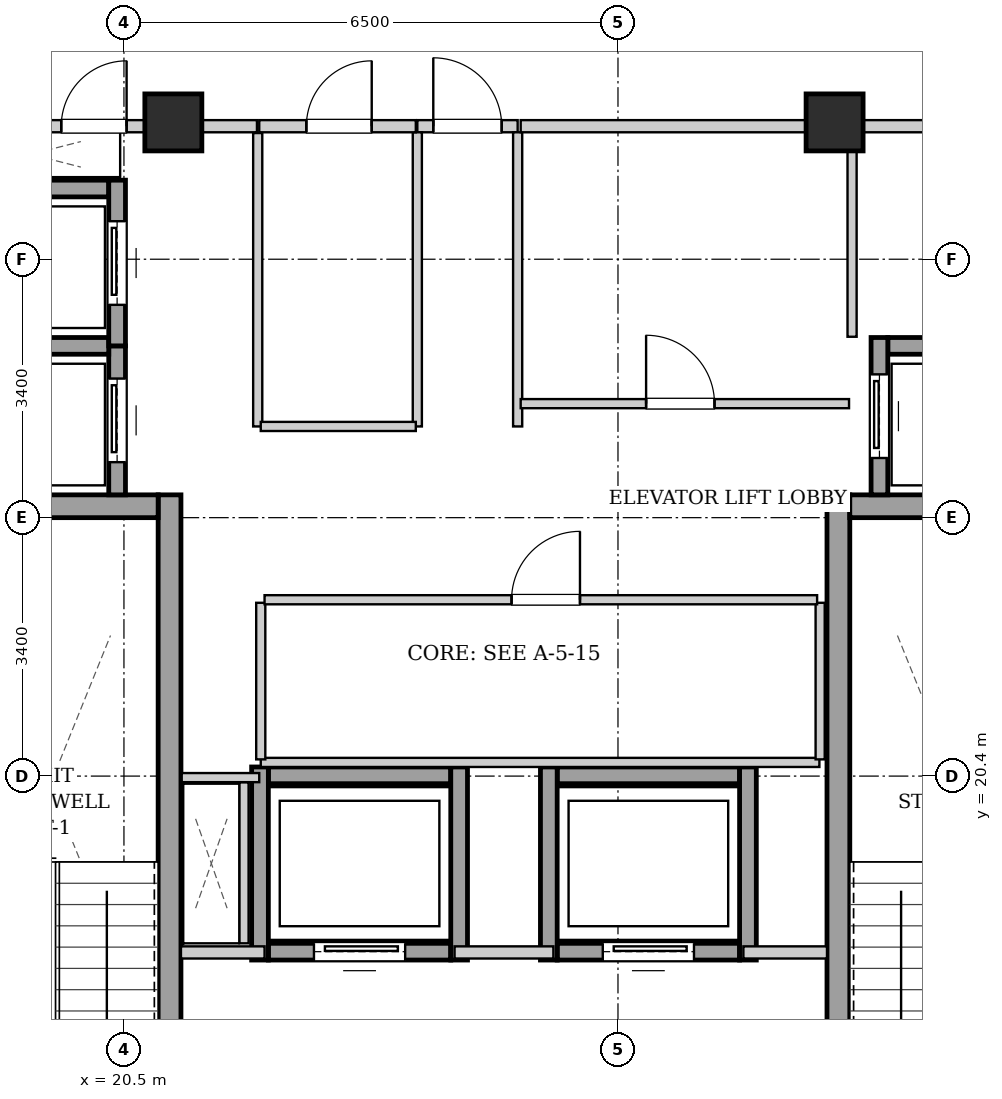
"""IFC4 building model, lengths in metres.
Left out: names, types, materials, properties, quantities, classifications, styles, units other than length and angle.
Written with IfcOpenShell. Run it as: python <this file> out.ifc"""

import sys

from ifc_helpers import new_model, si_unit, direction, frame, frame_2d, origin, origin_2d, place, context, subcontext, project, spatial, rectangle, extrude, element, fill, save


model = new_model("IFC4")
c1 = context("Model", 3, precision=1e-05, world=origin(), true_north=direction((0.0, 1.0)))
c2 = subcontext(c1, "Body", "Model", "MODEL_VIEW")
j1 = project(units=[si_unit("LENGTHUNIT", "METRE"), si_unit("PLANEANGLEUNIT", "RADIAN")], contexts=[c1])
p1 = place(None, origin())
s1 = spatial("IfcSite", under=j1, at=p1, CompositionType="ELEMENT")
p2 = place(p1, origin())
s2 = spatial("IfcBuilding", under=s1, at=p2, CompositionType="ELEMENT")
p3 = place(p2, frame((0.0, 0.0, 227.5)))
s3 = spatial("IfcBuildingStorey", under=s2, at=p3, CompositionType="ELEMENT", Elevation=227.5)
for number, where, z_axis, x_axis in (
    (1, (21.15, 29.0, 0.0), (0.0, 0.0, 1.0), (1.0, 0.0, 0.0)),
    (2, (29.85, 29.0, 0.0), (0.0, 0.0, 1.0), (1.0, 0.0, 0.0)),
):
    element("IfcColumn", number, at=place(p3, frame(where, z_axis=z_axis, x_axis=x_axis)), inside=s3, PredefinedType="COLUMN", context=c2, shape_type="SweptSolid", body=[
        extrude(rectangle(XDim=0.75, YDim=0.75, at=origin_2d()), origin(), (0.0, 0.0, 1.0), 3.4),
    ])
p4 = place(p3, frame((21.1, 15.1, 0.0), z_axis=(0.0, 0.0, 1.0), x_axis=(0.0, 1.0, 0.0)))
e3 = element("IfcWall", 3, at=p4, inside=s3, PredefinedType="SHEAR", context=c2, shape_type="SweptSolid", body=[
    extrude(rectangle(XDim=9.0, YDim=0.3, at=frame_2d((4.5, 0.0))), origin(), (0.0, 0.0, 1.0), 3.14),
])
p5 = place(p3, frame((18.1, 23.95, 0.0), z_axis=(0.0, 0.0, 1.0), x_axis=(1.0, 0.0, 0.0)))
e4 = element("IfcWall", 4, at=p5, inside=s3, PredefinedType="SHEAR", context=c2, shape_type="SweptSolid", body=[
    extrude(rectangle(XDim=2.85, YDim=0.3, at=frame_2d((1.425, 0.0))), origin(), (0.0, 0.0, 1.0), 3.14),
])
p6 = place(p3, frame((29.9, 15.1, 0.0), z_axis=(0.0, 0.0, 1.0), x_axis=(0.0, 1.0, 0.0)))
e5 = element("IfcWall", 5, at=p6, inside=s3, PredefinedType="SHEAR", context=c2, shape_type="SweptSolid", body=[
    extrude(rectangle(XDim=9.0, YDim=0.3, at=frame_2d((4.5, 0.0))), origin(), (0.0, 0.0, 1.0), 3.14),
])
p7 = place(p3, frame((30.05, 23.95, 0.0), z_axis=(0.0, 0.0, 1.0), x_axis=(1.0, 0.0, 0.0)))
e6 = element("IfcWall", 6, at=p7, inside=s3, PredefinedType="SHEAR", context=c2, shape_type="SweptSolid", body=[
    extrude(rectangle(XDim=2.85, YDim=0.3, at=frame_2d((1.425, 0.0))), origin(), (0.0, 0.0, 1.0), 3.14),
])
p8 = place(p3, frame((20.41, 24.1, 0.0), z_axis=(0.0, 0.0, 1.0), x_axis=(0.0, 1.0, 0.0)))
e7 = element("IfcWall", 7, at=p8, inside=s3, PredefinedType="SHEAR", context=c2, shape_type="SweptSolid", body=[
    extrude(rectangle(XDim=1.96, YDim=0.22, at=frame_2d((0.98, 0.0))), origin(), (0.0, 0.0, 1.0), 3.14),
])
p9 = place(p8, frame((0.43, 0.0, 0.0)))
e8 = element("IfcOpeningElement", 8, at=p9, cuts=e7, PredefinedType="OPENING", context=c2, shape_type="SweptSolid", body=[
    extrude(rectangle(XDim=1.1, YDim=2.15, at=frame_2d((0.55, 1.075))), frame((0.0, 0.12, 0.0), z_axis=(0.0, -1.0, 0.0), x_axis=(1.0, 0.0, 0.0)), (0.0, 0.0, 1.0), 0.24),
])
for number, where, z_axis, x_axis in (
    (9, (18.4, 26.06, 0.0), (0.0, 0.0, 1.0), (1.0, 0.0, 0.0)),
    (10, (18.4, 28.13, 0.0), (0.0, 0.0, 1.0), (1.0, 0.0, 0.0)),
):
    element("IfcWall", number, at=place(p3, frame(where, z_axis=z_axis, x_axis=x_axis)), inside=s3, PredefinedType="SHEAR", context=c2, shape_type="SweptSolid", body=[
        extrude(rectangle(XDim=1.9, YDim=0.22, at=frame_2d((0.95, 0.0))), origin(), (0.0, 0.0, 1.0), 3.14),
    ])
p10 = place(p3, frame((20.41, 26.06, 0.0), z_axis=(0.0, 0.0, 1.0), x_axis=(0.0, 1.0, 0.0)))
e11 = element("IfcWall", 11, at=p10, inside=s3, PredefinedType="SHEAR", context=c2, shape_type="SweptSolid", body=[
    extrude(rectangle(XDim=2.18, YDim=0.22, at=frame_2d((1.09, 0.0))), origin(), (0.0, 0.0, 1.0), 3.14),
])
p11 = place(p10, frame((0.54, 0.0, 0.0)))
e12 = element("IfcOpeningElement", 12, at=p11, cuts=e11, PredefinedType="OPENING", context=c2, shape_type="SweptSolid", body=[
    extrude(rectangle(XDim=1.1, YDim=2.15, at=frame_2d((0.55, 1.075))), frame((0.0, 0.12, 0.0), z_axis=(0.0, -1.0, 0.0), x_axis=(1.0, 0.0, 0.0)), (0.0, 0.0, 1.0), 0.24),
])
p12 = place(p3, frame((30.55, 26.06, 0.0), z_axis=(0.0, 0.0, 1.0), x_axis=(1.0, 0.0, 0.0)))
e13 = element("IfcWall", 13, at=p12, inside=s3, PredefinedType="SHEAR", context=c2, shape_type="SweptSolid", body=[
    extrude(rectangle(XDim=1.9, YDim=0.22, at=frame_2d((0.95, 0.0))), origin(), (0.0, 0.0, 1.0), 3.14),
])
p13 = place(p3, frame((30.44, 24.1, 0.0), z_axis=(0.0, 0.0, 1.0), x_axis=(0.0, 1.0, 0.0)))
e14 = element("IfcWall", 14, at=p13, inside=s3, PredefinedType="SHEAR", context=c2, shape_type="SweptSolid", body=[
    extrude(rectangle(XDim=2.07, YDim=0.22, at=frame_2d((1.035, 0.0))), origin(), (0.0, 0.0, 1.0), 3.14),
])
p14 = place(p13, frame((0.485, 0.0, 0.0)))
e15 = element("IfcOpeningElement", 15, at=p14, cuts=e14, PredefinedType="OPENING", context=c2, shape_type="SweptSolid", body=[
    extrude(rectangle(XDim=1.1, YDim=2.15, at=frame_2d((0.55, 1.075))), frame((0.0, 0.12, 0.0), z_axis=(0.0, -1.0, 0.0), x_axis=(1.0, 0.0, 0.0)), (0.0, 0.0, 1.0), 0.24),
])
p15 = place(p3, frame((22.4, 18.09, 0.0), z_axis=(0.0, 0.0, 1.0), x_axis=(1.0, 0.0, 0.0)))
e16 = element("IfcWall", 16, at=p15, inside=s3, PredefinedType="SHEAR", context=c2, shape_type="SweptSolid", body=[
    extrude(rectangle(XDim=2.4, YDim=0.22, at=frame_2d((1.2, 0.0))), origin(), (0.0, 0.0, 1.0), 3.14),
])
p16 = place(p15, frame((0.6, 0.0, 0.0)))
e17 = element("IfcOpeningElement", 17, at=p16, cuts=e16, PredefinedType="OPENING", context=c2, shape_type="SweptSolid", body=[
    extrude(rectangle(XDim=1.2, YDim=2.15, at=frame_2d((0.6, 1.075))), frame((0.0, 0.12, 0.0), z_axis=(0.0, -1.0, 0.0), x_axis=(1.0, 0.0, 0.0)), (0.0, 0.0, 1.0), 0.24),
])
p17 = place(p3, frame((22.4, 20.41, 0.0), z_axis=(0.0, 0.0, 1.0), x_axis=(1.0, 0.0, 0.0)))
e18 = element("IfcWall", 18, at=p17, inside=s3, PredefinedType="SHEAR", context=c2, shape_type="SweptSolid", body=[
    extrude(rectangle(XDim=2.4, YDim=0.22, at=frame_2d((1.2, 0.0))), origin(), (0.0, 0.0, 1.0), 3.14),
])
for number, where, z_axis, x_axis in (
    (19, (22.29, 17.98, 0.0), (0.0, 0.0, 1.0), (0.0, 1.0, 0.0)),
    (20, (24.91, 17.98, 0.0), (0.0, 0.0, 1.0), (0.0, 1.0, 0.0)),
):
    element("IfcWall", number, at=place(p3, frame(where, z_axis=z_axis, x_axis=x_axis)), inside=s3, PredefinedType="SHEAR", context=c2, shape_type="SweptSolid", body=[
        extrude(rectangle(XDim=2.54, YDim=0.22, at=frame_2d((1.27, 0.0))), origin(), (0.0, 0.0, 1.0), 3.14),
    ])
p18 = place(p3, frame((26.2, 18.09, 0.0), z_axis=(0.0, 0.0, 1.0), x_axis=(1.0, 0.0, 0.0)))
e21 = element("IfcWall", 21, at=p18, inside=s3, PredefinedType="SHEAR", context=c2, shape_type="SweptSolid", body=[
    extrude(rectangle(XDim=2.4, YDim=0.22, at=frame_2d((1.2, 0.0))), origin(), (0.0, 0.0, 1.0), 3.14),
])
p19 = place(p18, frame((0.6, 0.0, 0.0)))
e22 = element("IfcOpeningElement", 22, at=p19, cuts=e21, PredefinedType="OPENING", context=c2, shape_type="SweptSolid", body=[
    extrude(rectangle(XDim=1.2, YDim=2.15, at=frame_2d((0.6, 1.075))), frame((0.0, 0.12, 0.0), z_axis=(0.0, -1.0, 0.0), x_axis=(1.0, 0.0, 0.0)), (0.0, 0.0, 1.0), 0.24),
])
p20 = place(p3, frame((26.2, 20.41, 0.0), z_axis=(0.0, 0.0, 1.0), x_axis=(1.0, 0.0, 0.0)))
e23 = element("IfcWall", 23, at=p20, inside=s3, PredefinedType="SHEAR", context=c2, shape_type="SweptSolid", body=[
    extrude(rectangle(XDim=2.4, YDim=0.22, at=frame_2d((1.2, 0.0))), origin(), (0.0, 0.0, 1.0), 3.14),
])
for number, where, z_axis, x_axis in (
    (24, (26.09, 17.98, 0.0), (0.0, 0.0, 1.0), (0.0, 1.0, 0.0)),
    (25, (28.71, 17.98, 0.0), (0.0, 0.0, 1.0), (0.0, 1.0, 0.0)),
):
    element("IfcWall", number, at=place(p3, frame(where, z_axis=z_axis, x_axis=x_axis)), inside=s3, PredefinedType="SHEAR", context=c2, shape_type="SweptSolid", body=[
        extrude(rectangle(XDim=2.54, YDim=0.22, at=frame_2d((1.27, 0.0))), origin(), (0.0, 0.0, 1.0), 3.14),
    ])
p21 = place(p3, frame((21.25, 18.08, 0.0), z_axis=(0.0, 0.0, 1.0), x_axis=(1.0, 0.0, 0.0)))
e26 = element("IfcWall", 26, at=p21, inside=s3, PredefinedType="PARTITIONING", context=c2, shape_type="SweptSolid", body=[
    extrude(rectangle(XDim=1.1, YDim=0.16, at=frame_2d((0.55, 0.0))), origin(), (0.0, 0.0, 1.0), 3.14),
])
p22 = place(p3, frame((24.85, 18.08, 0.0), z_axis=(0.0, 0.0, 1.0), x_axis=(1.0, 0.0, 0.0)))
e27 = element("IfcWall", 27, at=p22, inside=s3, PredefinedType="PARTITIONING", context=c2, shape_type="SweptSolid", body=[
    extrude(rectangle(XDim=1.3, YDim=0.16, at=frame_2d((0.65, 0.0))), origin(), (0.0, 0.0, 1.0), 3.14),
])
p23 = place(p3, frame((28.65, 18.08, 0.0), z_axis=(0.0, 0.0, 1.0), x_axis=(1.0, 0.0, 0.0)))
e28 = element("IfcWall", 28, at=p23, inside=s3, PredefinedType="PARTITIONING", context=c2, shape_type="SweptSolid", body=[
    extrude(rectangle(XDim=1.1, YDim=0.16, at=frame_2d((0.55, 0.0))), origin(), (0.0, 0.0, 1.0), 3.14),
])
p24 = place(p3, frame((24.36, 28.95, 0.0), z_axis=(0.0, 0.0, 1.0), x_axis=(1.0, 0.0, 0.0)))
e29 = element("IfcWall", 29, at=p24, inside=s3, PredefinedType="PARTITIONING", context=c2, shape_type="SweptSolid", body=[
    extrude(rectangle(XDim=1.32, YDim=0.16, at=frame_2d((0.66, 0.0))), origin(), (0.0, 0.0, 1.0), 2.668),
])
p25 = place(p24, frame((0.21, 0.0, 0.0)))
e30 = element("IfcOpeningElement", 30, at=p25, cuts=e29, PredefinedType="OPENING", context=c2, shape_type="SweptSolid", body=[
    extrude(rectangle(XDim=0.9, YDim=2.05, at=frame_2d((0.45, 1.025))), frame((0.0, 0.09, 0.0), z_axis=(0.0, -1.0, 0.0), x_axis=(1.0, 0.0, 0.0)), (0.0, 0.0, 1.0), 0.18),
])
p26 = place(p3, frame((17.96, 28.95, 0.0), z_axis=(0.0, 0.0, 1.0), x_axis=(1.0, 0.0, 0.0)))
e31 = element("IfcWall", 31, at=p26, inside=s3, PredefinedType="PARTITIONING", context=c2, shape_type="SweptSolid", body=[
    extrude(rectangle(XDim=4.29, YDim=0.16, at=frame_2d((2.145, 0.0))), origin(), (0.0, 0.0, 1.0), 2.668),
])
p27 = place(p26, frame((1.715, 0.0, 0.0)))
e32 = element("IfcOpeningElement", 32, at=p27, cuts=e31, PredefinedType="OPENING", context=c2, shape_type="SweptSolid", body=[
    extrude(rectangle(XDim=0.86, YDim=2.05, at=frame_2d((0.43, 1.025))), frame((0.0, 0.09, 0.0), z_axis=(0.0, -1.0, 0.0), x_axis=(1.0, 0.0, 0.0)), (0.0, 0.0, 1.0), 0.18),
])
p28 = place(p3, frame((22.08, 18.2, 0.0), z_axis=(0.0, 0.0, 1.0), x_axis=(0.0, 1.0, 0.0)))
e33 = element("IfcWall", 33, at=p28, inside=s3, PredefinedType="PARTITIONING", context=c2, shape_type="SweptSolid", body=[
    extrude(rectangle(XDim=2.12, YDim=0.12, at=frame_2d((1.06, 0.0))), origin(), (0.0, 0.0, 1.0), 3.14),
])
p29 = place(p3, frame((22.28, 20.38, 0.0), z_axis=(0.0, 0.0, 1.0), x_axis=(-1.0, 0.0, 0.0)))
e34 = element("IfcWall", 34, at=p29, inside=s3, PredefinedType="PARTITIONING", context=c2, shape_type="SweptSolid", body=[
    extrude(rectangle(XDim=1.02, YDim=0.12, at=frame_2d((0.51, 0.0))), origin(), (0.0, 0.0, 1.0), 3.14),
])
for number, where, z_axis, x_axis in (
    (35, (24.36, 25.0, 0.0), (0.0, 0.0, 1.0), (0.0, 1.0, 0.0)),
    (36, (25.68, 25.0, 0.0), (0.0, 0.0, 1.0), (0.0, 1.0, 0.0)),
):
    element("IfcWall", number, at=place(p3, frame(where, z_axis=z_axis, x_axis=x_axis)), inside=s3, PredefinedType="PARTITIONING", context=c2, shape_type="SweptSolid", body=[
        extrude(rectangle(XDim=3.87, YDim=0.12, at=frame_2d((1.935, 0.0))), origin(), (0.0, 0.0, 1.0), 3.14),
    ])
p30 = place(p3, frame((30.08, 26.18, 0.0), z_axis=(0.0, 0.0, 1.0), x_axis=(0.0, 1.0, 0.0)))
e37 = element("IfcWall", 37, at=p30, inside=s3, PredefinedType="PARTITIONING", context=c2, shape_type="SweptSolid", body=[
    extrude(rectangle(XDim=2.68, YDim=0.12, at=frame_2d((1.34, 0.0))), origin(), (0.0, 0.0, 1.0), 3.14),
])
p31 = place(p3, frame((30.08, 28.95, 0.0), z_axis=(0.0, 0.0, 1.0), x_axis=(1.0, 0.0, 0.0)))
e38 = element("IfcWall", 38, at=p31, inside=s3, PredefinedType="PARTITIONING", context=c2, shape_type="SweptSolid", body=[
    extrude(rectangle(XDim=2.96, YDim=0.16, at=frame_2d((1.48, 0.0))), origin(), (0.0, 0.0, 1.0), 3.14),
])
p32 = place(p31, frame((1.045, 0.0, 0.0)))
e39 = element("IfcOpeningElement", 39, at=p32, cuts=e38, PredefinedType="OPENING", context=c2, shape_type="SweptSolid", body=[
    extrude(rectangle(XDim=0.86, YDim=2.05, at=frame_2d((0.43, 1.025))), frame((0.0, 0.09, 0.0), z_axis=(0.0, -1.0, 0.0), x_axis=(1.0, 0.0, 0.0)), (0.0, 0.0, 1.0), 0.18),
])
p33 = place(p3, frame((22.26, 25.0, 0.0), z_axis=(0.0, 0.0, 1.0), x_axis=(0.0, 1.0, 0.0)))
e40 = element("IfcWall", 40, at=p33, inside=s3, PredefinedType="PARTITIONING", context=c2, shape_type="SweptSolid", body=[
    extrude(rectangle(XDim=3.86, YDim=0.12, at=frame_2d((1.93, 0.0))), origin(), (0.0, 0.0, 1.0), 3.14),
])
p34 = place(p3, frame((22.3, 25.0, 0.0), z_axis=(0.0, 0.0, 1.0), x_axis=(1.0, 0.0, 0.0)))
e41 = element("IfcWall", 41, at=p34, inside=s3, PredefinedType="PARTITIONING", context=c2, shape_type="SweptSolid", body=[
    extrude(rectangle(XDim=2.04, YDim=0.12, at=frame_2d((1.02, 0.0))), origin(), (0.0, 0.0, 1.0), 3.14),
])
p35 = place(p3, frame((22.28, 28.95, 0.0), z_axis=(0.0, 0.0, 1.0), x_axis=(1.0, 0.0, 0.0)))
e42 = element("IfcWall", 42, at=p35, inside=s3, PredefinedType="PARTITIONING", context=c2, shape_type="SweptSolid", body=[
    extrude(rectangle(XDim=2.06, YDim=0.16, at=frame_2d((1.03, 0.0))), origin(), (0.0, 0.0, 1.0), 2.668),
])
p36 = place(p35, frame((0.62, 0.0, 0.0)))
e43 = element("IfcOpeningElement", 43, at=p36, cuts=e42, PredefinedType="OPENING", context=c2, shape_type="SweptSolid", body=[
    extrude(rectangle(XDim=0.86, YDim=2.05, at=frame_2d((0.43, 1.025))), frame((0.0, 0.09, 0.0), z_axis=(0.0, -1.0, 0.0), x_axis=(1.0, 0.0, 0.0)), (0.0, 0.0, 1.0), 0.18),
])
p37 = place(p3, frame((25.72, 28.95, 0.0), z_axis=(0.0, 0.0, 1.0), x_axis=(1.0, 0.0, 0.0)))
e44 = element("IfcWall", 44, at=p37, inside=s3, PredefinedType="PARTITIONING", context=c2, shape_type="SweptSolid", body=[
    extrude(rectangle(XDim=4.32, YDim=0.16, at=frame_2d((2.16, 0.0))), origin(), (0.0, 0.0, 1.0), 2.668),
])
p38 = place(p3, frame((25.72, 25.3, 0.0), z_axis=(0.0, 0.0, 1.0), x_axis=(1.0, 0.0, 0.0)))
e45 = element("IfcWall", 45, at=p38, inside=s3, PredefinedType="PARTITIONING", context=c2, shape_type="SweptSolid", body=[
    extrude(rectangle(XDim=4.32, YDim=0.12, at=frame_2d((2.16, 0.0))), origin(), (0.0, 0.0, 1.0), 3.14),
])
p39 = place(p38, frame((1.65, 0.0, 0.0)))
e46 = element("IfcOpeningElement", 46, at=p39, cuts=e45, PredefinedType="OPENING", context=c2, shape_type="SweptSolid", body=[
    extrude(rectangle(XDim=0.9, YDim=2.05, at=frame_2d((0.45, 1.025))), frame((0.0, 0.07, 0.0), z_axis=(0.0, -1.0, 0.0), x_axis=(1.0, 0.0, 0.0)), (0.0, 0.0, 1.0), 0.14),
])
p40 = place(p3, frame((22.3, 20.58, 0.0), z_axis=(0.0, 0.0, 1.0), x_axis=(1.0, 0.0, 0.0)))
e47 = element("IfcWall", 47, at=p40, inside=s3, PredefinedType="PARTITIONING", context=c2, shape_type="SweptSolid", body=[
    extrude(rectangle(XDim=7.35, YDim=0.12, at=frame_2d((3.675, 0.0))), origin(), (0.0, 0.0, 1.0), 3.14),
])
for number, where, z_axis, x_axis in (
    (48, (22.3, 20.62, 0.0), (0.0, 0.0, 1.0), (0.0, 1.0, 0.0)),
    (49, (29.66, 20.62, 0.0), (0.0, 0.0, 1.0), (0.0, 1.0, 0.0)),
):
    element("IfcWall", number, at=place(p3, frame(where, z_axis=z_axis, x_axis=x_axis)), inside=s3, PredefinedType="PARTITIONING", context=c2, shape_type="SweptSolid", body=[
        extrude(rectangle(XDim=2.06, YDim=0.12, at=frame_2d((1.03, 0.0))), origin(), (0.0, 0.0, 1.0), 3.14),
    ])
p41 = place(p3, frame((22.35, 22.72, 0.0), z_axis=(0.0, 0.0, 1.0), x_axis=(1.0, 0.0, 0.0)))
e50 = element("IfcWall", 50, at=p41, inside=s3, PredefinedType="PARTITIONING", context=c2, shape_type="SweptSolid", body=[
    extrude(rectangle(XDim=7.27, YDim=0.12, at=frame_2d((3.635, 0.0))), origin(), (0.0, 0.0, 1.0), 3.14),
])
p42 = place(p41, frame((3.25, 0.0, 0.0)))
e51 = element("IfcOpeningElement", 51, at=p42, cuts=e50, PredefinedType="OPENING", context=c2, shape_type="SweptSolid", body=[
    extrude(rectangle(XDim=0.9, YDim=2.05, at=frame_2d((0.45, 1.025))), frame((0.0, 0.07, 0.0), z_axis=(0.0, -1.0, 0.0), x_axis=(1.0, 0.0, 0.0)), (0.0, 0.0, 1.0), 0.14),
])
p43 = place(p9, origin())
e52 = element("IfcDoor", 52, at=p43, inside=s3, OperationType="SLIDING_TO_LEFT", PredefinedType="DOOR", context=c2, shape_type="SweptSolid", body=[
    extrude(rectangle(XDim=1.1, YDim=2.15, at=frame_2d((0.55, 1.075))), frame((0.0, 0.025, 0.0), z_axis=(0.0, -1.0, 0.0), x_axis=(1.0, 0.0, 0.0)), (0.0, 0.0, 1.0), 0.05),
])
fill(e8, e52)
p44 = place(p11, origin())
e53 = element("IfcDoor", 53, at=p44, inside=s3, OperationType="SLIDING_TO_LEFT", PredefinedType="DOOR", context=c2, shape_type="SweptSolid", body=[
    extrude(rectangle(XDim=1.1, YDim=2.15, at=frame_2d((0.55, 1.075))), frame((0.0, 0.025, 0.0), z_axis=(0.0, -1.0, 0.0), x_axis=(1.0, 0.0, 0.0)), (0.0, 0.0, 1.0), 0.05),
])
fill(e12, e53)
p45 = place(p14, origin())
e54 = element("IfcDoor", 54, at=p45, inside=s3, OperationType="SLIDING_TO_LEFT", PredefinedType="DOOR", context=c2, shape_type="SweptSolid", body=[
    extrude(rectangle(XDim=1.1, YDim=2.15, at=frame_2d((0.55, 1.075))), frame((0.0, 0.025, 0.0), z_axis=(0.0, -1.0, 0.0), x_axis=(1.0, 0.0, 0.0)), (0.0, 0.0, 1.0), 0.05),
])
fill(e15, e54)
p46 = place(p16, origin())
e55 = element("IfcDoor", 55, at=p46, inside=s3, OperationType="SLIDING_TO_LEFT", PredefinedType="DOOR", context=c2, shape_type="SweptSolid", body=[
    extrude(rectangle(XDim=1.2, YDim=2.15, at=frame_2d((0.6, 1.075))), frame((0.0, 0.025, 0.0), z_axis=(0.0, -1.0, 0.0), x_axis=(1.0, 0.0, 0.0)), (0.0, 0.0, 1.0), 0.05),
])
fill(e17, e55)
p47 = place(p19, origin())
e56 = element("IfcDoor", 56, at=p47, inside=s3, OperationType="SLIDING_TO_LEFT", PredefinedType="DOOR", context=c2, shape_type="SweptSolid", body=[
    extrude(rectangle(XDim=1.2, YDim=2.15, at=frame_2d((0.6, 1.075))), frame((0.0, 0.025, 0.0), z_axis=(0.0, -1.0, 0.0), x_axis=(1.0, 0.0, 0.0)), (0.0, 0.0, 1.0), 0.05),
])
fill(e22, e56)
p48 = place(p25, origin())
e57 = element("IfcDoor", 57, at=p48, inside=s3, OperationType="SINGLE_SWING_LEFT", PredefinedType="DOOR", context=c2, shape_type="SweptSolid", body=[
    extrude(rectangle(XDim=0.9, YDim=2.05, at=frame_2d((0.45, 1.025))), frame((0.0, 0.025, 0.0), z_axis=(0.0, -1.0, 0.0), x_axis=(1.0, 0.0, 0.0)), (0.0, 0.0, 1.0), 0.05),
])
fill(e30, e57)
p49 = place(p27, origin())
e58 = element("IfcDoor", 58, at=p49, inside=s3, OperationType="SINGLE_SWING_RIGHT", PredefinedType="DOOR", context=c2, shape_type="SweptSolid", body=[
    extrude(rectangle(XDim=0.86, YDim=2.05, at=frame_2d((0.43, 1.025))), frame((0.0, 0.025, 0.0), z_axis=(0.0, -1.0, 0.0), x_axis=(1.0, 0.0, 0.0)), (0.0, 0.0, 1.0), 0.05),
])
fill(e32, e58)
p50 = place(p36, origin())
e59 = element("IfcDoor", 59, at=p50, inside=s3, OperationType="SINGLE_SWING_RIGHT", PredefinedType="DOOR", context=c2, shape_type="SweptSolid", body=[
    extrude(rectangle(XDim=0.86, YDim=2.05, at=frame_2d((0.43, 1.025))), frame((0.0, 0.025, 0.0), z_axis=(0.0, -1.0, 0.0), x_axis=(1.0, 0.0, 0.0)), (0.0, 0.0, 1.0), 0.05),
])
fill(e43, e59)
p51 = place(p39, origin())
e60 = element("IfcDoor", 60, at=p51, inside=s3, OperationType="SINGLE_SWING_LEFT", PredefinedType="DOOR", context=c2, shape_type="SweptSolid", body=[
    extrude(rectangle(XDim=0.9, YDim=2.05, at=frame_2d((0.45, 1.025))), frame((0.0, 0.025, 0.0), z_axis=(0.0, -1.0, 0.0), x_axis=(1.0, 0.0, 0.0)), (0.0, 0.0, 1.0), 0.05),
])
fill(e46, e60)
p52 = place(p42, origin())
e61 = element("IfcDoor", 61, at=p52, inside=s3, OperationType="SINGLE_SWING_RIGHT", PredefinedType="DOOR", context=c2, shape_type="SweptSolid", body=[
    extrude(rectangle(XDim=0.9, YDim=2.05, at=frame_2d((0.45, 1.025))), frame((0.0, 0.025, 0.0), z_axis=(0.0, -1.0, 0.0), x_axis=(1.0, 0.0, 0.0)), (0.0, 0.0, 1.0), 0.05),
])
fill(e51, e61)
save(model, sys.argv[1])
